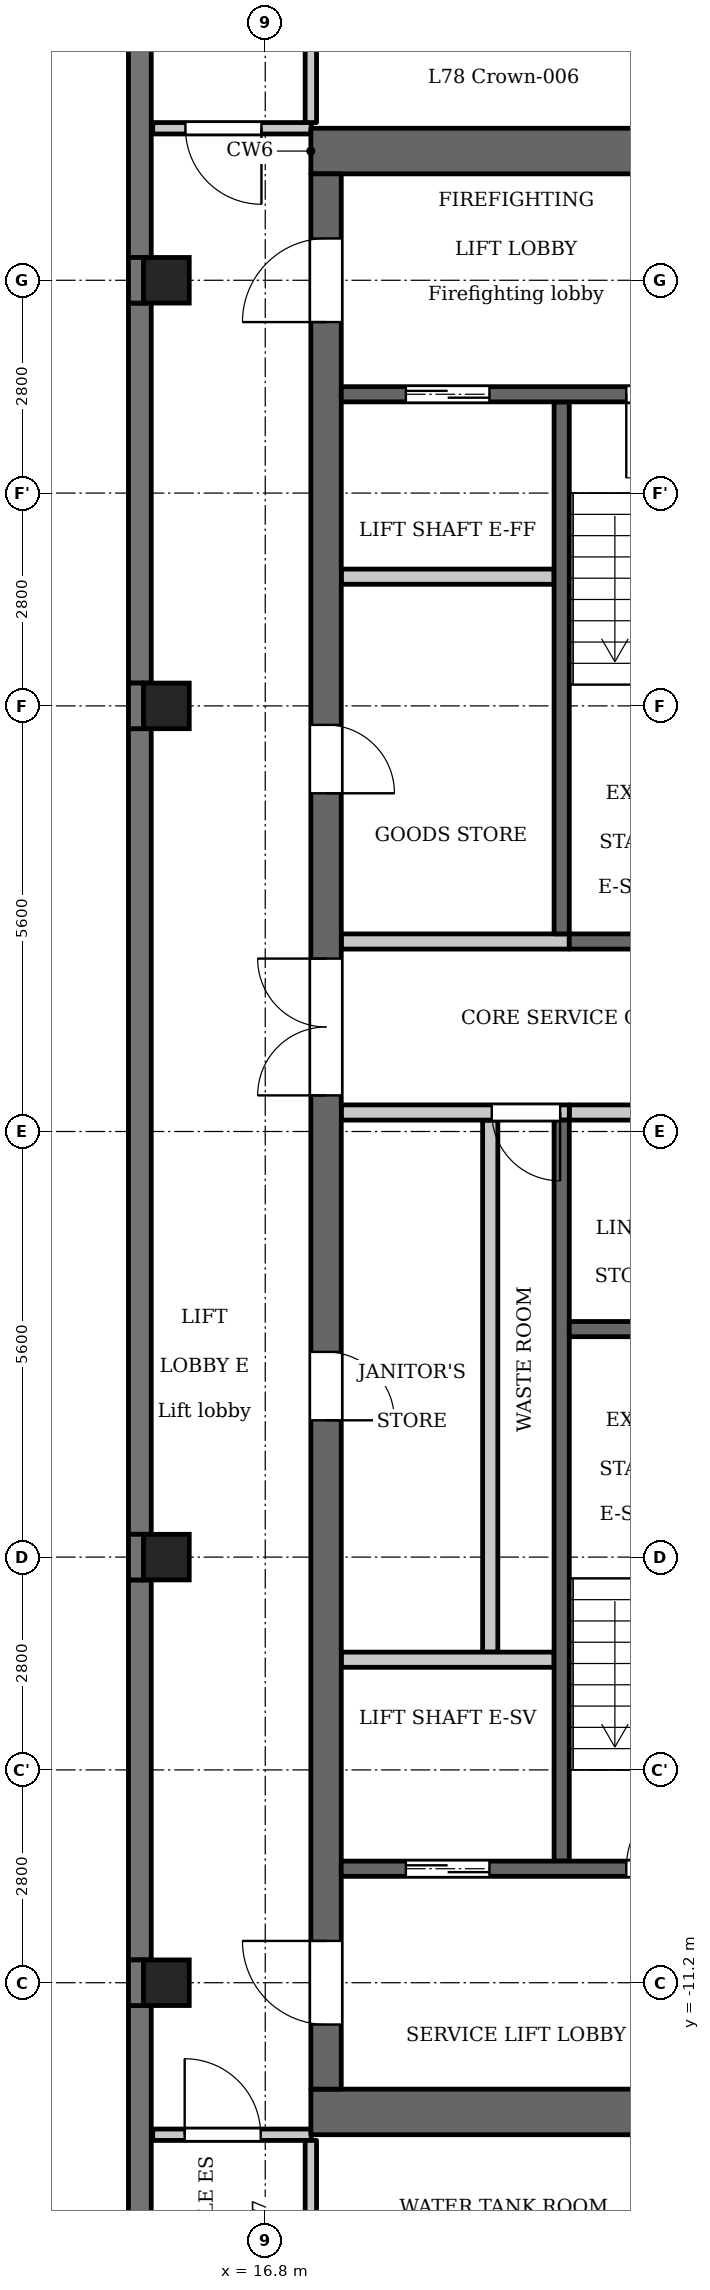
"""IFC4 building model, lengths in metres.
Left out: names, types, materials, properties, quantities, classifications, styles, units other than length and angle.
Written with IfcOpenShell. Run it as: python <this file> out.ifc"""

import sys

from ifc_helpers import new_model, si_unit, direction, frame, frame_2d, origin, origin_2d, place, context, subcontext, project, spatial, polyline, rectangle, outline, extrude, element, fill, save


model = new_model("IFC4")
c1 = context("Model", 3, precision=1e-05, world=origin(), true_north=direction((0.0, 1.0)))
c2 = subcontext(c1, "Body", "Model", "MODEL_VIEW")
j1 = project(units=[si_unit("LENGTHUNIT", "METRE"), si_unit("PLANEANGLEUNIT", "RADIAN")], contexts=[c1])
p1 = place(None, origin())
s1 = spatial("IfcSite", under=j1, at=p1, CompositionType="ELEMENT")
p2 = place(p1, origin())
s2 = spatial("IfcBuilding", under=s1, at=p2, CompositionType="ELEMENT")
p3 = place(p2, frame((0.0, 0.0, 303.4)))
s3 = spatial("IfcBuildingStorey", under=s2, at=p3, CompositionType="ELEMENT", Elevation=303.4)
for number, where, z_axis, x_axis in (
    (1, (15.5, -11.2, 0.0), (0.0, 0.0, 1.0), (1.0, 0.0, 0.0)),
    (2, (15.5, -5.6, 0.0), (0.0, 0.0, 1.0), (1.0, 0.0, 0.0)),
    (3, (15.5, 5.6, 0.0), (0.0, 0.0, 1.0), (1.0, 0.0, 0.0)),
    (4, (15.5, 11.2, 0.0), (0.0, 0.0, 1.0), (1.0, 0.0, 0.0)),
):
    element("IfcColumn", number, at=place(p3, frame(where, z_axis=z_axis, x_axis=x_axis)), inside=s3, PredefinedType="COLUMN", context=c2, shape_type="SweptSolid", body=[
        extrude(rectangle(XDim=0.6, YDim=0.6, at=origin_2d()), origin(), (0.0, 0.0, 1.0), 3.5),
    ])
p4 = place(p3, frame((15.15, 18.8, 0.0), z_axis=(0.0, 0.0, 1.0), x_axis=(0.0, -1.0, 0.0)))
e5 = element("IfcWall", 5, at=p4, inside=s3, PredefinedType="SOLIDWALL", context=c2, shape_type="SweptSolid", body=[
    extrude(rectangle(XDim=7.3, YDim=0.3, at=frame_2d((3.65, 0.0))), origin(), (0.0, 0.0, 1.0), 3.2),
])
p5 = place(p4, frame((1.863, 0.0, 0.9)))
e6 = element("IfcOpeningElement", 6, at=p5, cuts=e5, PredefinedType="OPENING", context=c2, shape_type="SweptSolid", body=[
    extrude(rectangle(XDim=1.8, YDim=1.25, at=frame_2d((0.9, 0.625))), frame((0.0, 0.16, 0.0), z_axis=(0.0, -1.0, 0.0), x_axis=(1.0, 0.0, 0.0)), (0.0, 0.0, 1.0), 0.32),
])
p6 = place(p3, frame((15.15, 10.9, 0.0), z_axis=(0.0, 0.0, 1.0), x_axis=(0.0, -1.0, 0.0)))
e7 = element("IfcWall", 7, at=p6, inside=s3, PredefinedType="SOLIDWALL", context=c2, shape_type="SweptSolid", body=[
    extrude(rectangle(XDim=5.0, YDim=0.3, at=frame_2d((2.5, 0.0))), origin(), (0.0, 0.0, 1.0), 3.2),
])
p7 = place(p3, frame((15.15, 5.3, 0.0), z_axis=(0.0, 0.0, 1.0), x_axis=(0.0, -1.0, 0.0)))
e8 = element("IfcWall", 8, at=p7, inside=s3, PredefinedType="SOLIDWALL", context=c2, shape_type="SweptSolid", body=[
    extrude(rectangle(XDim=10.6, YDim=0.3, at=frame_2d((5.3, 0.0))), origin(), (0.0, 0.0, 1.0), 3.2),
])
p8 = place(p3, frame((15.15, -5.9, 0.0), z_axis=(0.0, 0.0, 1.0), x_axis=(0.0, -1.0, 0.0)))
e9 = element("IfcWall", 9, at=p8, inside=s3, PredefinedType="SOLIDWALL", context=c2, shape_type="SweptSolid", body=[
    extrude(rectangle(XDim=5.0, YDim=0.3, at=frame_2d((2.5, 0.0))), origin(), (0.0, 0.0, 1.0), 3.2),
])
p9 = place(p3, frame((15.15, -11.5, 0.0), z_axis=(0.0, 0.0, 1.0), x_axis=(0.0, -1.0, 0.0)))
e10 = element("IfcWall", 10, at=p9, inside=s3, PredefinedType="SOLIDWALL", context=c2, shape_type="SweptSolid", body=[
    extrude(rectangle(XDim=7.3, YDim=0.3, at=frame_2d((3.65, 0.0))), origin(), (0.0, 0.0, 1.0), 3.2),
])
p10 = place(p9, frame((3.637, 0.0, 0.9)))
e11 = element("IfcOpeningElement", 11, at=p10, cuts=e10, PredefinedType="OPENING", context=c2, shape_type="SweptSolid", body=[
    extrude(rectangle(XDim=1.8, YDim=1.25, at=frame_2d((0.9, 0.625))), frame((0.0, 0.16, 0.0), z_axis=(0.0, -1.0, 0.0), x_axis=(1.0, 0.0, 0.0)), (0.0, 0.0, 1.0), 0.32),
])
p11 = place(p3, frame((20.7, 2.6, 0.0), z_axis=(0.0, 0.0, 1.0), x_axis=(0.0, 1.0, 0.0)))
e12 = element("IfcWall", 12, at=p11, inside=s3, PredefinedType="SHEAR", context=c2, shape_type="SweptSolid", body=[
    extrude(rectangle(XDim=7.0, YDim=0.2, at=frame_2d((3.5, 0.0))), origin(), (0.0, 0.0, 1.0), 3.2),
])
p12 = place(p3, frame((20.7, -9.6, 0.0), z_axis=(0.0, 0.0, 1.0), x_axis=(0.0, 1.0, 0.0)))
e13 = element("IfcWall", 13, at=p12, inside=s3, PredefinedType="SHEAR", context=c2, shape_type="SweptSolid", body=[
    extrude(rectangle(XDim=9.75, YDim=0.2, at=frame_2d((4.875, 0.0))), origin(), (0.0, 0.0, 1.0), 3.2),
])
p13 = place(p3, frame((20.8, 2.5, 0.0), z_axis=(0.0, 0.0, 1.0), x_axis=(1.0, 0.0, 0.0)))
e14 = element("IfcWall", 14, at=p13, inside=s3, PredefinedType="SHEAR", context=c2, shape_type="SweptSolid", body=[
    extrude(rectangle(XDim=2.8, YDim=0.2, at=frame_2d((1.4, 0.0))), origin(), (0.0, 0.0, 1.0), 3.2),
])
p14 = place(p3, frame((20.8, 0.25, 0.0), z_axis=(0.0, 0.0, 1.0), x_axis=(1.0, 0.0, 0.0)))
e15 = element("IfcWall", 15, at=p14, inside=s3, PredefinedType="PARTITIONING", context=c2, shape_type="SweptSolid", body=[
    extrude(rectangle(XDim=2.8, YDim=0.2, at=frame_2d((1.4, 0.0))), origin(), (0.0, 0.0, 1.0), 3.2),
])
p15 = place(p14, frame((0.95, 0.0, 0.0)))
e16 = element("IfcOpeningElement", 16, at=p15, cuts=e15, PredefinedType="OPENING", context=c2, shape_type="SweptSolid", body=[
    extrude(rectangle(XDim=0.9, YDim=2.1, at=frame_2d((0.45, 1.05))), frame((0.0, 0.11, 0.0), z_axis=(0.0, -1.0, 0.0), x_axis=(1.0, 0.0, 0.0)), (0.0, 0.0, 1.0), 0.22),
])
for number, where, z_axis, x_axis in (
    (17, (17.4, 12.9, 0.0), (0.0, 0.0, 1.0), (1.0, 0.0, 0.0)),
    (18, (17.4, -12.9, 0.0), (0.0, 0.0, 1.0), (1.0, 0.0, 0.0)),
):
    element("IfcWall", number, at=place(p3, frame(where, z_axis=z_axis, x_axis=x_axis)), inside=s3, PredefinedType="SHEAR", context=c2, shape_type="SweptSolid", body=[
        extrude(rectangle(XDim=7.6, YDim=0.6, at=frame_2d((3.8, 0.0))), origin(), (0.0, 0.0, 1.0), 3.2),
    ])
p16 = place(p3, frame((19.76, -6.85, 0.0), z_axis=(0.0, 0.0, 1.0), x_axis=(0.0, 1.0, 0.0)))
e19 = element("IfcWall", 19, at=p16, inside=s3, PredefinedType="PARTITIONING", context=c2, shape_type="SweptSolid", body=[
    extrude(rectangle(XDim=7.0, YDim=0.2, at=frame_2d((3.5, 0.0))), origin(), (0.0, 0.0, 1.0), 3.2),
])
p17 = place(p3, frame((17.6, -12.6, 0.0), z_axis=(0.0, 0.0, 1.0), x_axis=(0.0, 1.0, 0.0)))
e20 = element("IfcWall", 20, at=p17, inside=s3, PredefinedType="SHEAR", context=c2, shape_type="SweptSolid", body=[
    extrude(rectangle(XDim=25.2, YDim=0.4, at=frame_2d((12.6, 0.0))), origin(), (0.0, 0.0, 1.0), 3.2),
])
p18 = place(p17, frame((8.8, 0.0, 0.0)))
e21 = element("IfcOpeningElement", 21, at=p18, cuts=e20, PredefinedType="OPENING", context=c2, shape_type="SweptSolid", body=[
    extrude(rectangle(XDim=0.9, YDim=2.1, at=frame_2d((0.45, 1.05))), frame((0.0, 0.21, 0.0), z_axis=(0.0, -1.0, 0.0), x_axis=(1.0, 0.0, 0.0)), (0.0, 0.0, 1.0), 0.42),
])
p19 = place(p17, frame((17.05, 0.0, 0.0)))
e22 = element("IfcOpeningElement", 22, at=p19, cuts=e20, PredefinedType="OPENING", context=c2, shape_type="SweptSolid", body=[
    extrude(rectangle(XDim=0.9, YDim=2.1, at=frame_2d((0.45, 1.05))), frame((0.0, 0.21, 0.0), z_axis=(0.0, -1.0, 0.0), x_axis=(1.0, 0.0, 0.0)), (0.0, 0.0, 1.0), 0.42),
])
p20 = place(p17, frame((23.25, 0.0, 0.0)))
e23 = element("IfcOpeningElement", 23, at=p20, cuts=e20, PredefinedType="OPENING", context=c2, shape_type="SweptSolid", body=[
    extrude(rectangle(XDim=1.1, YDim=2.1, at=frame_2d((0.55, 1.05))), frame((0.0, 0.21, 0.0), z_axis=(0.0, -1.0, 0.0), x_axis=(1.0, 0.0, 0.0)), (0.0, 0.0, 1.0), 0.42),
])
p21 = place(p17, frame((0.85, 0.0, 0.0)))
e24 = element("IfcOpeningElement", 24, at=p21, cuts=e20, PredefinedType="OPENING", context=c2, shape_type="SweptSolid", body=[
    extrude(rectangle(XDim=1.1, YDim=2.1, at=frame_2d((0.55, 1.05))), frame((0.0, 0.21, 0.0), z_axis=(0.0, -1.0, 0.0), x_axis=(1.0, 0.0, 0.0)), (0.0, 0.0, 1.0), 0.42),
])
p22 = place(p17, frame((13.075, 0.0, 0.0)))
e25 = element("IfcOpeningElement", 25, at=p22, cuts=e20, PredefinedType="OPENING", context=c2, shape_type="SweptSolid", body=[
    extrude(rectangle(XDim=1.8, YDim=2.1, at=frame_2d((0.9, 1.05))), frame((0.0, 0.21, 0.0), z_axis=(0.0, -1.0, 0.0), x_axis=(1.0, 0.0, 0.0)), (0.0, 0.0, 1.0), 0.42),
])
p23 = place(p3, frame((17.8, -9.7, 0.0), z_axis=(0.0, 0.0, 1.0), x_axis=(1.0, 0.0, 0.0)))
e26 = element("IfcWall", 26, at=p23, inside=s3, PredefinedType="SHEAR", context=c2, shape_type="SweptSolid", body=[
    extrude(rectangle(XDim=5.8, YDim=0.2, at=frame_2d((2.9, 0.0))), origin(), (0.0, 0.0, 1.0), 3.2),
])
p24 = place(p23, frame((0.85, 0.0, 0.0)))
e27 = element("IfcOpeningElement", 27, at=p24, cuts=e26, PredefinedType="OPENING", context=c2, shape_type="SweptSolid", body=[
    extrude(rectangle(XDim=1.1, YDim=2.1, at=frame_2d((0.55, 1.05))), frame((0.0, 0.11, 0.0), z_axis=(0.0, -1.0, 0.0), x_axis=(1.0, 0.0, 0.0)), (0.0, 0.0, 1.0), 0.22),
])
p25 = place(p23, frame((3.75, 0.0, 0.0)))
e28 = element("IfcOpeningElement", 28, at=p25, cuts=e26, PredefinedType="OPENING", context=c2, shape_type="SweptSolid", body=[
    extrude(rectangle(XDim=1.1, YDim=2.1, at=frame_2d((0.55, 1.05))), frame((0.0, 0.11, 0.0), z_axis=(0.0, -1.0, 0.0), x_axis=(1.0, 0.0, 0.0)), (0.0, 0.0, 1.0), 0.22),
])
p26 = place(p3, frame((17.8, -6.95, 0.0), z_axis=(0.0, 0.0, 1.0), x_axis=(1.0, 0.0, 0.0)))
e29 = element("IfcWall", 29, at=p26, inside=s3, PredefinedType="PARTITIONING", context=c2, shape_type="SweptSolid", body=[
    extrude(rectangle(XDim=2.8, YDim=0.2, at=frame_2d((1.4, 0.0))), origin(), (0.0, 0.0, 1.0), 3.2),
])
p27 = place(p3, frame((17.8, 0.25, 0.0), z_axis=(0.0, 0.0, 1.0), x_axis=(1.0, 0.0, 0.0)))
e30 = element("IfcWall", 30, at=p27, inside=s3, PredefinedType="PARTITIONING", context=c2, shape_type="SweptSolid", body=[
    extrude(rectangle(XDim=3.0, YDim=0.2, at=frame_2d((1.5, 0.0))), origin(), (0.0, 0.0, 1.0), 3.2),
])
p28 = place(p27, frame((1.98, 0.0, 0.0)))
e31 = element("IfcOpeningElement", 31, at=p28, cuts=e30, PredefinedType="OPENING", context=c2, shape_type="SweptSolid", body=[
    extrude(rectangle(XDim=0.9, YDim=2.1, at=frame_2d((0.45, 1.05))), frame((0.0, 0.11, 0.0), z_axis=(0.0, -1.0, 0.0), x_axis=(1.0, 0.0, 0.0)), (0.0, 0.0, 1.0), 0.22),
])
p29 = place(p3, frame((17.8, 2.5, 0.0), z_axis=(0.0, 0.0, 1.0), x_axis=(1.0, 0.0, 0.0)))
e32 = element("IfcWall", 32, at=p29, inside=s3, PredefinedType="PARTITIONING", context=c2, shape_type="SweptSolid", body=[
    extrude(rectangle(XDim=3.0, YDim=0.2, at=frame_2d((1.5, 0.0))), origin(), (0.0, 0.0, 1.0), 3.2),
])
p30 = place(p3, frame((17.8, 7.3, 0.0), z_axis=(0.0, 0.0, 1.0), x_axis=(1.0, 0.0, 0.0)))
e33 = element("IfcWall", 33, at=p30, inside=s3, PredefinedType="PARTITIONING", context=c2, shape_type="SweptSolid", body=[
    extrude(rectangle(XDim=2.8, YDim=0.2, at=frame_2d((1.4, 0.0))), origin(), (0.0, 0.0, 1.0), 3.2),
])
p31 = place(p3, frame((17.8, 9.7, 0.0), z_axis=(0.0, 0.0, 1.0), x_axis=(1.0, 0.0, 0.0)))
e34 = element("IfcWall", 34, at=p31, inside=s3, PredefinedType="SHEAR", context=c2, shape_type="SweptSolid", body=[
    extrude(rectangle(XDim=5.8, YDim=0.2, at=frame_2d((2.9, 0.0))), origin(), (0.0, 0.0, 1.0), 3.2),
])
p32 = place(p31, frame((0.85, 0.0, 0.0)))
e35 = element("IfcOpeningElement", 35, at=p32, cuts=e34, PredefinedType="OPENING", context=c2, shape_type="SweptSolid", body=[
    extrude(rectangle(XDim=1.1, YDim=2.1, at=frame_2d((0.55, 1.05))), frame((0.0, 0.11, 0.0), z_axis=(0.0, -1.0, 0.0), x_axis=(1.0, 0.0, 0.0)), (0.0, 0.0, 1.0), 0.22),
])
p33 = place(p31, frame((3.75, 0.0, 0.0)))
e36 = element("IfcOpeningElement", 36, at=p33, cuts=e34, PredefinedType="OPENING", context=c2, shape_type="SweptSolid", body=[
    extrude(rectangle(XDim=1.1, YDim=2.1, at=frame_2d((0.55, 1.05))), frame((0.0, 0.11, 0.0), z_axis=(0.0, -1.0, 0.0), x_axis=(1.0, 0.0, 0.0)), (0.0, 0.0, 1.0), 0.22),
])
p34 = place(p3, frame((20.8, -2.6, 0.0), z_axis=(0.0, 0.0, 1.0), x_axis=(1.0, 0.0, 0.0)))
e37 = element("IfcWall", 37, at=p34, inside=s3, PredefinedType="SHEAR", context=c2, shape_type="SweptSolid", body=[
    extrude(rectangle(XDim=2.6, YDim=0.2, at=frame_2d((1.3, 0.0))), origin(), (0.0, 0.0, 1.0), 3.2),
])
p35 = place(p3, frame((15.32, -13.2, 0.0), z_axis=(0.0, 0.0, 1.0), x_axis=(1.0, 0.0, 0.0)))
e38 = element("IfcWall", 38, at=p35, inside=s3, PredefinedType="PARTITIONING", context=c2, shape_type="SweptSolid", body=[
    extrude(rectangle(XDim=2.085, YDim=0.15, at=frame_2d((1.042, 0.0))), origin(), (0.0, 0.0, 1.0), 3.2),
])
p36 = place(p35, frame((0.42, 0.0, 0.0)))
e39 = element("IfcOpeningElement", 39, at=p36, cuts=e38, PredefinedType="OPENING", context=c2, shape_type="SweptSolid", body=[
    extrude(rectangle(XDim=1.0, YDim=2.1, at=frame_2d((0.5, 1.05))), frame((0.0, 0.085, 0.0), z_axis=(0.0, -1.0, 0.0), x_axis=(1.0, 0.0, 0.0)), (0.0, 0.0, 1.0), 0.17),
])
p37 = place(p3, frame((15.32, 13.2, 0.0), z_axis=(0.0, 0.0, 1.0), x_axis=(1.0, 0.0, 0.0)))
e40 = element("IfcWall", 40, at=p37, inside=s3, PredefinedType="PARTITIONING", context=c2, shape_type="SweptSolid", body=[
    extrude(rectangle(XDim=2.085, YDim=0.15, at=frame_2d((1.042, 0.0))), origin(), (0.0, 0.0, 1.0), 3.2),
])
p38 = place(p37, frame((0.43, 0.0, 0.0)))
e41 = element("IfcOpeningElement", 41, at=p38, cuts=e40, PredefinedType="OPENING", context=c2, shape_type="SweptSolid", body=[
    extrude(rectangle(XDim=1.0, YDim=2.1, at=frame_2d((0.5, 1.05))), frame((0.0, 0.085, 0.0), z_axis=(0.0, -1.0, 0.0), x_axis=(1.0, 0.0, 0.0)), (0.0, 0.0, 1.0), 0.17),
])
p39 = place(p3, frame((17.4, -19.236, 0.0), z_axis=(0.0, 0.0, 1.0), x_axis=(0.0, 1.0, 0.0)))
e42 = element("IfcWall", 42, at=p39, inside=s3, PredefinedType="PARTITIONING", context=c2, shape_type="SweptSolid", body=[
    extrude(rectangle(XDim=5.961, YDim=0.15, at=frame_2d((2.981, 0.0))), origin(), (0.0, 0.0, 1.0), 3.2),
])
p40 = place(p39, frame((3.917, 0.0, 0.0)))
e43 = element("IfcOpeningElement", 43, at=p40, cuts=e42, PredefinedType="OPENING", context=c2, shape_type="SweptSolid", body=[
    extrude(rectangle(XDim=0.9, YDim=2.1, at=frame_2d((0.45, 1.05))), frame((0.0, 0.085, 0.0), z_axis=(0.0, -1.0, 0.0), x_axis=(1.0, 0.0, 0.0)), (0.0, 0.0, 1.0), 0.17),
])
p41 = place(p3, frame((17.4, 13.275, 0.0), z_axis=(0.0, 0.0, 1.0), x_axis=(0.0, 1.0, 0.0)))
e44 = element("IfcWall", 44, at=p41, inside=s3, PredefinedType="PARTITIONING", context=c2, shape_type="SweptSolid", body=[
    extrude(rectangle(XDim=5.961, YDim=0.15, at=frame_2d((2.981, 0.0))), origin(), (0.0, 0.0, 1.0), 3.2),
])
p42 = place(p41, frame((4.575, 0.0, 0.0)))
e45 = element("IfcOpeningElement", 45, at=p42, cuts=e44, PredefinedType="OPENING", context=c2, shape_type="SweptSolid", body=[
    extrude(rectangle(XDim=0.9, YDim=2.1, at=frame_2d((0.45, 1.05))), frame((0.0, 0.085, 0.0), z_axis=(0.0, -1.0, 0.0), x_axis=(1.0, 0.0, 0.0)), (0.0, 0.0, 1.0), 0.17),
])
p43 = place(p3, origin())
e46 = element("IfcWall", 46, at=p43, inside=s3, PredefinedType="SOLIDWALL", context=c2, shape_type="SweptSolid", body=[
    extrude(outline(polyline([(15.2, -10.9), (15.0, -10.9), (15.0, -11.5), (15.2, -11.5), (15.2, -10.9)])), origin(), (0.0, 0.0, 1.0), 3.2),
])
e47 = element("IfcWall", 47, at=p43, inside=s3, PredefinedType="SOLIDWALL", context=c2, shape_type="SweptSolid", body=[
    extrude(outline(polyline([(15.2, -5.3), (15.0, -5.3), (15.0, -5.9), (15.3, -5.9), (15.2, -5.9), (15.2, -5.3)])), origin(), (0.0, 0.0, 1.0), 3.2),
])
e48 = element("IfcWall", 48, at=p43, inside=s3, PredefinedType="SOLIDWALL", context=c2, shape_type="SweptSolid", body=[
    extrude(outline(polyline([(15.3, 5.9), (15.0, 5.9), (15.0, 5.3), (15.3, 5.3), (15.2, 5.3), (15.2, 5.9), (15.3, 5.9)])), origin(), (0.0, 0.0, 1.0), 3.2),
])
e49 = element("IfcWall", 49, at=p43, inside=s3, PredefinedType="SOLIDWALL", context=c2, shape_type="SweptSolid", body=[
    extrude(outline(polyline([(15.2, 11.5), (15.0, 11.5), (15.0, 10.9), (15.2, 10.9), (15.2, 11.5)])), origin(), (0.0, 0.0, 1.0), 3.2),
])
p44 = place(p24, origin())
e50 = element("IfcDoor", 50, at=p44, inside=s3, OperationType="DOUBLE_DOOR_SLIDING", PredefinedType="DOOR", context=c2, shape_type="SweptSolid", body=[
    extrude(rectangle(XDim=1.1, YDim=2.1, at=frame_2d((0.55, 1.05))), frame((0.0, 0.025, 0.0), z_axis=(0.0, -1.0, 0.0), x_axis=(1.0, 0.0, 0.0)), (0.0, 0.0, 1.0), 0.05),
])
fill(e27, e50)
p45 = place(p18, origin())
e51 = element("IfcDoor", 51, at=p45, inside=s3, OperationType="SINGLE_SWING_LEFT", PredefinedType="DOOR", context=c2, shape_type="SweptSolid", body=[
    extrude(rectangle(XDim=0.9, YDim=2.1, at=frame_2d((0.45, 1.05))), frame((0.0, 0.025, 0.0), z_axis=(0.0, -1.0, 0.0), x_axis=(1.0, 0.0, 0.0)), (0.0, 0.0, 1.0), 0.05),
])
fill(e21, e51)
p46 = place(p28, origin())
e52 = element("IfcDoor", 52, at=p46, inside=s3, OperationType="SINGLE_SWING_RIGHT", PredefinedType="DOOR", context=c2, shape_type="SweptSolid", body=[
    extrude(rectangle(XDim=0.9, YDim=2.1, at=frame_2d((0.45, 1.05))), frame((0.0, 0.025, 0.0), z_axis=(0.0, -1.0, 0.0), x_axis=(1.0, 0.0, 0.0)), (0.0, 0.0, 1.0), 0.05),
])
fill(e31, e52)
p47 = place(p19, origin())
e53 = element("IfcDoor", 53, at=p47, inside=s3, OperationType="SINGLE_SWING_LEFT", PredefinedType="DOOR", context=c2, shape_type="SweptSolid", body=[
    extrude(rectangle(XDim=0.9, YDim=2.1, at=frame_2d((0.45, 1.05))), frame((0.0, 0.025, 0.0), z_axis=(0.0, -1.0, 0.0), x_axis=(1.0, 0.0, 0.0)), (0.0, 0.0, 1.0), 0.05),
])
fill(e22, e53)
p48 = place(p32, origin())
e54 = element("IfcDoor", 54, at=p48, inside=s3, OperationType="DOUBLE_DOOR_SLIDING", PredefinedType="DOOR", context=c2, shape_type="SweptSolid", body=[
    extrude(rectangle(XDim=1.1, YDim=2.1, at=frame_2d((0.55, 1.05))), frame((0.0, 0.025, 0.0), z_axis=(0.0, -1.0, 0.0), x_axis=(1.0, 0.0, 0.0)), (0.0, 0.0, 1.0), 0.05),
])
fill(e35, e54)
p49 = place(p20, origin())
e55 = element("IfcDoor", 55, at=p49, inside=s3, OperationType="SINGLE_SWING_RIGHT", PredefinedType="DOOR", context=c2, shape_type="SweptSolid", body=[
    extrude(rectangle(XDim=1.1, YDim=2.1, at=frame_2d((0.55, 1.05))), frame((0.0, 0.025, 0.0), z_axis=(0.0, -1.0, 0.0), x_axis=(1.0, 0.0, 0.0)), (0.0, 0.0, 1.0), 0.05),
])
fill(e23, e55)
p50 = place(p21, origin())
e56 = element("IfcDoor", 56, at=p50, inside=s3, OperationType="SINGLE_SWING_LEFT", PredefinedType="DOOR", context=c2, shape_type="SweptSolid", body=[
    extrude(rectangle(XDim=1.1, YDim=2.1, at=frame_2d((0.55, 1.05))), frame((0.0, 0.025, 0.0), z_axis=(0.0, -1.0, 0.0), x_axis=(1.0, 0.0, 0.0)), (0.0, 0.0, 1.0), 0.05),
])
fill(e24, e56)
p51 = place(p33, origin())
e57 = element("IfcDoor", 57, at=p51, inside=s3, OperationType="SINGLE_SWING_LEFT", PredefinedType="DOOR", context=c2, shape_type="SweptSolid", body=[
    extrude(rectangle(XDim=1.1, YDim=2.1, at=frame_2d((0.55, 1.05))), frame((0.0, 0.025, 0.0), z_axis=(0.0, -1.0, 0.0), x_axis=(1.0, 0.0, 0.0)), (0.0, 0.0, 1.0), 0.05),
])
fill(e36, e57)
p52 = place(p25, origin())
e58 = element("IfcDoor", 58, at=p52, inside=s3, OperationType="SINGLE_SWING_LEFT", PredefinedType="DOOR", context=c2, shape_type="SweptSolid", body=[
    extrude(rectangle(XDim=1.1, YDim=2.1, at=frame_2d((0.55, 1.05))), frame((0.0, 0.025, 0.0), z_axis=(0.0, -1.0, 0.0), x_axis=(1.0, 0.0, 0.0)), (0.0, 0.0, 1.0), 0.05),
])
fill(e28, e58)
p53 = place(p22, origin())
e59 = element("IfcDoor", 59, at=p53, inside=s3, OperationType="DOUBLE_DOOR_SINGLE_SWING", PredefinedType="DOOR", context=c2, shape_type="SweptSolid", body=[
    extrude(rectangle(XDim=1.8, YDim=2.1, at=frame_2d((0.9, 1.05))), frame((0.0, 0.025, 0.0), z_axis=(0.0, -1.0, 0.0), x_axis=(1.0, 0.0, 0.0)), (0.0, 0.0, 1.0), 0.05),
])
fill(e25, e59)
p54 = place(p38, origin())
e60 = element("IfcDoor", 60, at=p54, inside=s3, OperationType="SINGLE_SWING_RIGHT", PredefinedType="DOOR", context=c2, shape_type="SweptSolid", body=[
    extrude(rectangle(XDim=1.0, YDim=2.1, at=frame_2d((0.5, 1.05))), frame((0.0, 0.025, 0.0), z_axis=(0.0, -1.0, 0.0), x_axis=(1.0, 0.0, 0.0)), (0.0, 0.0, 1.0), 0.05),
])
fill(e41, e60)
p55 = place(p36, origin())
e61 = element("IfcDoor", 61, at=p55, inside=s3, OperationType="SINGLE_SWING_RIGHT", PredefinedType="DOOR", context=c2, shape_type="SweptSolid", body=[
    extrude(rectangle(XDim=1.0, YDim=2.1, at=frame_2d((0.5, 1.05))), frame((0.0, 0.025, 0.0), z_axis=(0.0, -1.0, 0.0), x_axis=(1.0, 0.0, 0.0)), (0.0, 0.0, 1.0), 0.05),
])
fill(e39, e61)
save(model, sys.argv[1])
